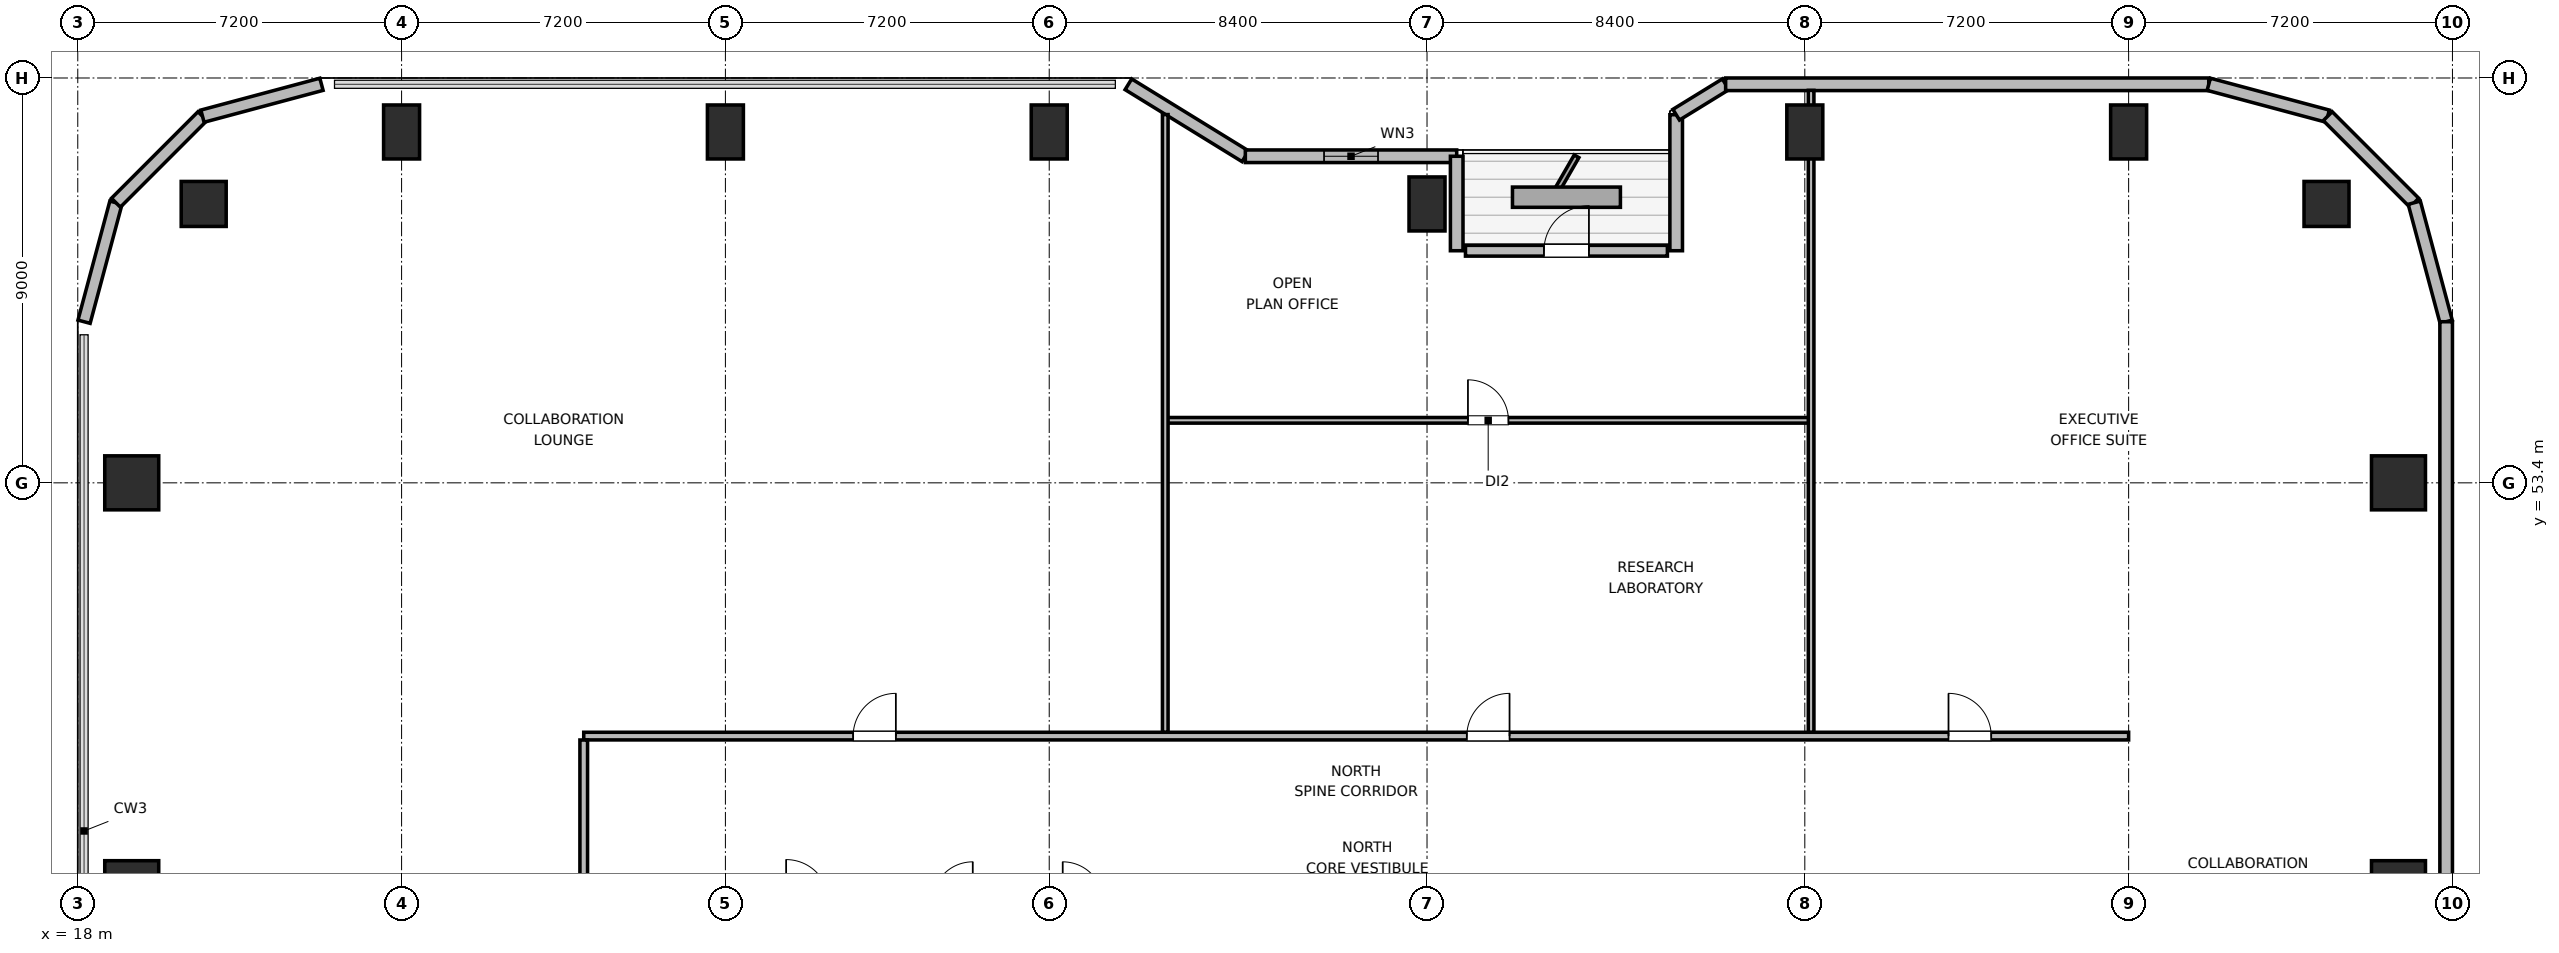
"""IFC4 building model, lengths in metres.
Left out: names, types, materials, properties, quantities, classifications, styles, units other than length and angle.
Written with IfcOpenShell. Run it as: python <this file> out.ifc"""

import sys

from ifc_helpers import new_model, si_unit, direction, frame, frame_2d, origin, origin_2d, place, context, subcontext, project, spatial, rectangle, circle, extrude, element, fill, save


model = new_model("IFC4")
c1 = context("Model", 3, precision=1e-05, world=origin(), true_north=direction((0.0, 1.0)))
c2 = subcontext(c1, "Body", "Model", "MODEL_VIEW")
j1 = project(units=[si_unit("LENGTHUNIT", "METRE"), si_unit("PLANEANGLEUNIT", "RADIAN")], contexts=[c1])
p1 = place(None, origin())
s1 = spatial("IfcSite", under=j1, at=p1, CompositionType="ELEMENT")
p2 = place(p1, origin())
s2 = spatial("IfcBuilding", under=s1, at=p2, CompositionType="ELEMENT")
p3 = place(p2, frame((0.0, 0.0, 190.2)))
s3 = spatial("IfcBuildingStorey", under=s2, at=p3, CompositionType="ELEMENT", Elevation=190.2)
for number, where, z_axis, x_axis in (
    (1, (68.0, 59.6, 0.0), (0.0, 0.0, 1.0), (1.0, 0.0, 0.0)),
    (2, (20.8, 59.6, 0.0), (0.0, 0.0, 1.0), (1.0, 0.0, 0.0)),
):
    element("IfcColumn", number, at=place(p3, frame(where, z_axis=z_axis, x_axis=x_axis)), inside=s3, PredefinedType="COLUMN", context=c2, shape_type="SweptSolid", body=[
        extrude(circle(Radius=0.5, at=origin_2d()), origin(), (0.0, 0.0, 1.0), 3.9),
    ])
for number, where, z_axis, x_axis in (
    (3, (25.2, 61.2, 0.0), (0.0, 0.0, 1.0), (1.0, 0.0, 0.0)),
    (4, (32.4, 61.2, 0.0), (0.0, 0.0, 1.0), (1.0, 0.0, 0.0)),
    (5, (39.6, 61.2, 0.0), (0.0, 0.0, 1.0), (1.0, 0.0, 0.0)),
    (6, (48.0, 59.6, 0.0), (0.0, 0.0, 1.0), (1.0, 0.0, 0.0)),
    (7, (56.4, 61.2, 0.0), (0.0, 0.0, 1.0), (1.0, 0.0, 0.0)),
    (8, (63.6, 61.2, 0.0), (0.0, 0.0, 1.0), (1.0, 0.0, 0.0)),
):
    element("IfcColumn", number, at=place(p3, frame(where, z_axis=z_axis, x_axis=x_axis)), inside=s3, PredefinedType="COLUMN", context=c2, shape_type="SweptSolid", body=[
        extrude(rectangle(XDim=0.8, YDim=1.2, at=origin_2d()), origin(), (0.0, 0.0, 1.0), 3.9),
    ])
for number, where, z_axis, x_axis in (
    (9, (19.2, 44.4, 0.0), (0.0, 0.0, 1.0), (1.0, 0.0, 0.0)),
    (10, (69.6, 44.4, 0.0), (0.0, 0.0, 1.0), (1.0, 0.0, 0.0)),
    (11, (19.2, 53.4, 0.0), (0.0, 0.0, 1.0), (1.0, 0.0, 0.0)),
    (12, (69.6, 53.4, 0.0), (0.0, 0.0, 1.0), (1.0, 0.0, 0.0)),
):
    element("IfcColumn", number, at=place(p3, frame(where, z_axis=z_axis, x_axis=x_axis)), inside=s3, PredefinedType="COLUMN", context=c2, shape_type="SweptSolid", body=[
        extrude(rectangle(XDim=1.2, YDim=1.2, at=origin_2d()), origin(), (0.0, 0.0, 1.0), 3.9),
    ])
p4 = place(p3, frame((18.14, 56.982, 0.0), z_axis=(0.0, 0.0, 1.0), x_axis=(0.258672222976, 0.9659651552, 0.0)))
e13 = element("IfcWall", 13, at=p4, inside=s3, PredefinedType="SOLIDWALL", context=c2, shape_type="SweptSolid", body=[
    extrude(rectangle(XDim=2.739, YDim=0.28, at=frame_2d((1.37, 0.0))), origin(), (0.0, 0.0, 1.0), 3.68),
])
p5 = place(p3, frame((18.848, 59.627, 0.0), z_axis=(0.0, 0.0, 1.0), x_axis=(0.707106781187, 0.707106781187, 0.0)))
e14 = element("IfcWall", 14, at=p5, inside=s3, PredefinedType="SOLIDWALL", context=c2, shape_type="SweptSolid", body=[
    extrude(rectangle(XDim=2.721, YDim=0.28, at=frame_2d((1.36, 0.0))), origin(), (0.0, 0.0, 1.0), 3.68),
])
p6 = place(p3, frame((20.772, 61.552, 0.0), z_axis=(0.0, 0.0, 1.0), x_axis=(0.965971118627, 0.258649952598, 0.0)))
e15 = element("IfcWall", 15, at=p6, inside=s3, PredefinedType="SOLIDWALL", context=c2, shape_type="SweptSolid", body=[
    extrude(rectangle(XDim=2.739, YDim=0.28, at=frame_2d((1.37, 0.0))), origin(), (0.0, 0.0, 1.0), 3.68),
])
p7 = place(p3, frame((41.36, 62.26, 0.0), z_axis=(0.0, 0.0, 1.0), x_axis=(0.851652825334, -0.524106349037, 0.0)))
e16 = element("IfcWall", 16, at=p7, inside=s3, PredefinedType="SOLIDWALL", context=c2, shape_type="SweptSolid", body=[
    extrude(rectangle(XDim=3.053, YDim=0.28, at=frame_2d((1.526, 0.0))), origin(), (0.0, 0.0, 1.0), 2.265),
])
p8 = place(p3, frame((43.96, 60.66, 0.0), z_axis=(0.0, 0.0, 1.0), x_axis=(1.0, 0.0, 0.0)))
e17 = element("IfcWall", 17, at=p8, inside=s3, PredefinedType="SOLIDWALL", context=c2, shape_type="SweptSolid", body=[
    extrude(rectangle(XDim=4.699, YDim=0.28, at=frame_2d((2.35, 0.0))), origin(), (0.0, 0.0, 1.0), 2.265),
])
p9 = place(p8, frame((1.75, 0.0, 0.85)))
e18 = element("IfcOpeningElement", 18, at=p9, cuts=e17, PredefinedType="OPENING", context=c2, shape_type="SweptSolid", body=[
    extrude(rectangle(XDim=1.2, YDim=1.1, at=frame_2d((0.6, 0.55))), frame((0.0, 0.15, 0.0), z_axis=(0.0, -1.0, 0.0), x_axis=(1.0, 0.0, 0.0)), (0.0, 0.0, 1.0), 0.3),
])
p10 = place(p3, frame((48.66, 60.66, 0.0), z_axis=(0.0, 0.0, 1.0), x_axis=(0.0, -1.0, 0.0)))
e19 = element("IfcWall", 19, at=p10, inside=s3, PredefinedType="SOLIDWALL", context=c2, shape_type="SweptSolid", body=[
    extrude(rectangle(XDim=2.1, YDim=0.28, at=frame_2d((1.05, 0.0))), origin(), (0.0, 0.0, 1.0), 2.265),
])
p11 = place(p3, frame((48.855, 58.56, 0.0), z_axis=(0.0, 0.0, 1.0), x_axis=(1.0, 0.0, 0.0)))
e20 = element("IfcWall", 20, at=p11, inside=s3, PredefinedType="SOLIDWALL", context=c2, shape_type="SweptSolid", body=[
    extrude(rectangle(XDim=4.49, YDim=0.24, at=frame_2d((2.245, 0.0))), origin(), (0.0, 0.0, 1.0), 3.68),
])
p12 = place(p11, frame((1.745, 0.0, 0.0)))
e21 = element("IfcOpeningElement", 21, at=p12, cuts=e20, PredefinedType="OPENING", context=c2, shape_type="SweptSolid", body=[
    extrude(rectangle(XDim=1.0, YDim=2.02, at=frame_2d((0.5, 1.01))), frame((0.0, 0.13, 0.0), z_axis=(0.0, -1.0, 0.0), x_axis=(1.0, 0.0, 0.0)), (0.0, 0.0, 1.0), 0.26),
])
p13 = place(p3, frame((53.54, 58.56, 0.0), z_axis=(0.0, 0.0, 1.0), x_axis=(0.0, 1.0, 0.0)))
e22 = element("IfcWall", 22, at=p13, inside=s3, PredefinedType="SOLIDWALL", context=c2, shape_type="SweptSolid", body=[
    extrude(rectangle(XDim=3.024, YDim=0.28, at=frame_2d((1.512, 0.0))), origin(), (0.0, 0.0, 1.0), 2.265),
])
p14 = place(p3, frame((53.54, 61.584, 0.0), z_axis=(0.0, 0.0, 1.0), x_axis=(0.851801140441, 0.523865266212, 0.0)))
e23 = element("IfcWall", 23, at=p14, inside=s3, PredefinedType="SOLIDWALL", context=c2, shape_type="SweptSolid", body=[
    extrude(rectangle(XDim=1.291, YDim=0.28, at=frame_2d((0.646, 0.0))), origin(), (0.0, 0.0, 1.0), 3.68),
])
p15 = place(p3, frame((54.64, 62.26, 0.0), z_axis=(0.0, 0.0, 1.0), x_axis=(1.0, 0.0, 0.0)))
e24 = element("IfcWall", 24, at=p15, inside=s3, PredefinedType="SOLIDWALL", context=c2, shape_type="SweptSolid", body=[
    extrude(rectangle(XDim=10.742, YDim=0.28, at=frame_2d((5.371, 0.0))), origin(), (0.0, 0.0, 1.0), 3.68),
])
p16 = place(p3, frame((65.382, 62.26, 0.0), z_axis=(0.0, 0.0, 1.0), x_axis=(0.965971118627, -0.258649952598, 0.0)))
e25 = element("IfcWall", 25, at=p16, inside=s3, PredefinedType="SOLIDWALL", context=c2, shape_type="SweptSolid", body=[
    extrude(rectangle(XDim=2.739, YDim=0.28, at=frame_2d((1.37, 0.0))), origin(), (0.0, 0.0, 1.0), 3.68),
])
p17 = place(p3, frame((68.028, 61.552, 0.0), z_axis=(0.0, 0.0, 1.0), x_axis=(0.707061915429, -0.707151644098, 0.0)))
e26 = element("IfcWall", 26, at=p17, inside=s3, PredefinedType="SOLIDWALL", context=c2, shape_type="SweptSolid", body=[
    extrude(rectangle(XDim=2.721, YDim=0.28, at=frame_2d((1.36, 0.0))), origin(), (0.0, 0.0, 1.0), 3.68),
])
p18 = place(p3, frame((69.951, 59.627, 0.0), z_axis=(0.0, 0.0, 1.0), x_axis=(0.258672222976, -0.9659651552, 0.0)))
e27 = element("IfcWall", 27, at=p18, inside=s3, PredefinedType="SOLIDWALL", context=c2, shape_type="SweptSolid", body=[
    extrude(rectangle(XDim=2.739, YDim=0.28, at=frame_2d((1.37, 0.0))), origin(), (0.0, 0.0, 1.0), 3.68),
])
p19 = place(p3, frame((70.66, 56.982, 0.0), z_axis=(0.0, 0.0, 1.0), x_axis=(0.0, -1.0, 0.0)))
e28 = element("IfcWall", 28, at=p19, inside=s3, PredefinedType="SOLIDWALL", context=c2, shape_type="SweptSolid", body=[
    extrude(rectangle(XDim=14.242, YDim=0.28, at=frame_2d((7.121, 0.0))), origin(), (0.0, 0.0, 1.0), 3.68),
])
p20 = place(p3, frame((29.25, 47.77, 0.0), z_axis=(0.0, 0.0, 1.0), x_axis=(1.0, 0.0, 0.0)))
e29 = element("IfcWall", 29, at=p20, inside=s3, PredefinedType="PARTITIONING", context=c2, shape_type="SweptSolid", body=[
    extrude(rectangle(XDim=34.35, YDim=0.17, at=frame_2d((17.175, 0.0))), origin(), (0.0, 0.0, 1.0), 3.68),
])
p21 = place(p20, frame((5.99, 0.0, 0.0)))
e30 = element("IfcOpeningElement", 30, at=p21, cuts=e29, PredefinedType="OPENING", context=c2, shape_type="SweptSolid", body=[
    extrude(rectangle(XDim=0.95, YDim=2.04, at=frame_2d((0.475, 1.02))), frame((0.0, 0.095, 0.0), z_axis=(0.0, -1.0, 0.0), x_axis=(1.0, 0.0, 0.0)), (0.0, 0.0, 1.0), 0.19),
])
p22 = place(p20, frame((19.635, 0.0, 0.0)))
e31 = element("IfcOpeningElement", 31, at=p22, cuts=e29, PredefinedType="OPENING", context=c2, shape_type="SweptSolid", body=[
    extrude(rectangle(XDim=0.95, YDim=2.04, at=frame_2d((0.475, 1.02))), frame((0.0, 0.095, 0.0), z_axis=(0.0, -1.0, 0.0), x_axis=(1.0, 0.0, 0.0)), (0.0, 0.0, 1.0), 0.19),
])
p23 = place(p20, frame((30.345, 0.0, 0.0)))
e32 = element("IfcOpeningElement", 32, at=p23, cuts=e29, PredefinedType="OPENING", context=c2, shape_type="SweptSolid", body=[
    extrude(rectangle(XDim=0.95, YDim=2.04, at=frame_2d((0.475, 1.02))), frame((0.0, 0.095, 0.0), z_axis=(0.0, -1.0, 0.0), x_axis=(1.0, 0.0, 0.0)), (0.0, 0.0, 1.0), 0.19),
])
p24 = place(p3, frame((29.25, 37.1, 0.0), z_axis=(0.0, 0.0, 1.0), x_axis=(0.0, 1.0, 0.0)))
e33 = element("IfcWall", 33, at=p24, inside=s3, PredefinedType="PARTITIONING", context=c2, shape_type="SweptSolid", body=[
    extrude(rectangle(XDim=10.583, YDim=0.17, at=frame_2d((5.292, 0.0))), origin(), (0.0, 0.0, 1.0), 3.68),
])
p25 = place(p24, frame((4.86, 0.0, 0.0)))
e34 = element("IfcOpeningElement", 34, at=p25, cuts=e33, PredefinedType="OPENING", context=c2, shape_type="SweptSolid", body=[
    extrude(rectangle(XDim=0.95, YDim=2.04, at=frame_2d((0.475, 1.02))), frame((0.0, 0.095, 0.0), z_axis=(0.0, -1.0, 0.0), x_axis=(1.0, 0.0, 0.0)), (0.0, 0.0, 1.0), 0.19),
])
p26 = place(p3, frame((42.18, 54.79, 0.0), z_axis=(0.0, 0.0, 1.0), x_axis=(1.0, 0.0, 0.0)))
e35 = element("IfcWall", 35, at=p26, inside=s3, PredefinedType="PARTITIONING", context=c2, shape_type="SweptSolid", body=[
    extrude(rectangle(XDim=14.36, YDim=0.125, at=frame_2d((7.18, 0.0))), origin(), (0.0, 0.0, 1.0), 3.68),
])
p27 = place(p26, frame((6.73, 0.0, 0.0)))
e36 = element("IfcOpeningElement", 36, at=p27, cuts=e35, PredefinedType="OPENING", context=c2, shape_type="SweptSolid", body=[
    extrude(rectangle(XDim=0.9, YDim=2.02, at=frame_2d((0.45, 1.01))), frame((0.0, 0.073, 0.0), z_axis=(0.0, -1.0, 0.0), x_axis=(1.0, 0.0, 0.0)), (0.0, 0.0, 1.0), 0.145),
])
p28 = place(p3, frame((42.18, 47.857, 0.0), z_axis=(0.0, 0.0, 1.0), x_axis=(0.0, 1.0, 0.0)))
e37 = element("IfcWall", 37, at=p28, inside=s3, PredefinedType="PARTITIONING", context=c2, shape_type="SweptSolid", body=[
    extrude(rectangle(XDim=13.73, YDim=0.125, at=frame_2d((6.865, 0.0))), origin(), (0.0, 0.0, 1.0), 3.043),
])
p29 = place(p3, frame((56.54, 47.857, 0.0), z_axis=(0.0, 0.0, 1.0), x_axis=(0.0, 1.0, 0.0)))
e38 = element("IfcWall", 38, at=p29, inside=s3, PredefinedType="PARTITIONING", context=c2, shape_type="SweptSolid", body=[
    extrude(rectangle(XDim=14.268, YDim=0.125, at=frame_2d((7.134, 0.0))), origin(), (0.0, 0.0, 1.0), 3.043),
])
p30 = place(p9, origin())
e39 = element("IfcWindow", 39, at=p30, inside=s3, PartitioningType="SINGLE_PANEL", PredefinedType="WINDOW", context=c2, shape_type="SweptSolid", body=[
    extrude(rectangle(XDim=1.2, YDim=1.1, at=frame_2d((0.6, 0.55))), frame((0.0, 0.03, 0.0), z_axis=(0.0, -1.0, 0.0), x_axis=(1.0, 0.0, 0.0)), (0.0, 0.0, 1.0), 0.06),
])
fill(e18, e39)
p31 = place(p12, origin())
e40 = element("IfcDoor", 40, at=p31, inside=s3, OperationType="SINGLE_SWING_RIGHT", PredefinedType="DOOR", context=c2, shape_type="SweptSolid", body=[
    extrude(rectangle(XDim=1.0, YDim=2.02, at=frame_2d((0.5, 1.01))), frame((0.0, 0.025, 0.0), z_axis=(0.0, -1.0, 0.0), x_axis=(1.0, 0.0, 0.0)), (0.0, 0.0, 1.0), 0.05),
])
fill(e21, e40)
p32 = place(p21, origin())
e41 = element("IfcDoor", 41, at=p32, inside=s3, OperationType="SINGLE_SWING_RIGHT", PredefinedType="DOOR", context=c2, shape_type="SweptSolid", body=[
    extrude(rectangle(XDim=0.95, YDim=2.04, at=frame_2d((0.475, 1.02))), frame((0.0, 0.025, 0.0), z_axis=(0.0, -1.0, 0.0), x_axis=(1.0, 0.0, 0.0)), (0.0, 0.0, 1.0), 0.05),
])
fill(e30, e41)
p33 = place(p27, origin())
e42 = element("IfcDoor", 42, at=p33, inside=s3, OperationType="SINGLE_SWING_LEFT", PredefinedType="DOOR", context=c2, shape_type="SweptSolid", body=[
    extrude(rectangle(XDim=0.9, YDim=2.02, at=frame_2d((0.45, 1.01))), frame((0.0, 0.025, 0.0), z_axis=(0.0, -1.0, 0.0), x_axis=(1.0, 0.0, 0.0)), (0.0, 0.0, 1.0), 0.05),
])
fill(e36, e42)
p34 = place(p22, origin())
e43 = element("IfcDoor", 43, at=p34, inside=s3, OperationType="SINGLE_SWING_RIGHT", PredefinedType="DOOR", context=c2, shape_type="SweptSolid", body=[
    extrude(rectangle(XDim=0.95, YDim=2.04, at=frame_2d((0.475, 1.02))), frame((0.0, 0.025, 0.0), z_axis=(0.0, -1.0, 0.0), x_axis=(1.0, 0.0, 0.0)), (0.0, 0.0, 1.0), 0.05),
])
fill(e31, e43)
p35 = place(p23, origin())
e44 = element("IfcDoor", 44, at=p35, inside=s3, OperationType="SINGLE_SWING_LEFT", PredefinedType="DOOR", context=c2, shape_type="SweptSolid", body=[
    extrude(rectangle(XDim=0.95, YDim=2.04, at=frame_2d((0.475, 1.02))), frame((0.0, 0.025, 0.0), z_axis=(0.0, -1.0, 0.0), x_axis=(1.0, 0.0, 0.0)), (0.0, 0.0, 1.0), 0.05),
])
fill(e32, e44)
save(model, sys.argv[1])
